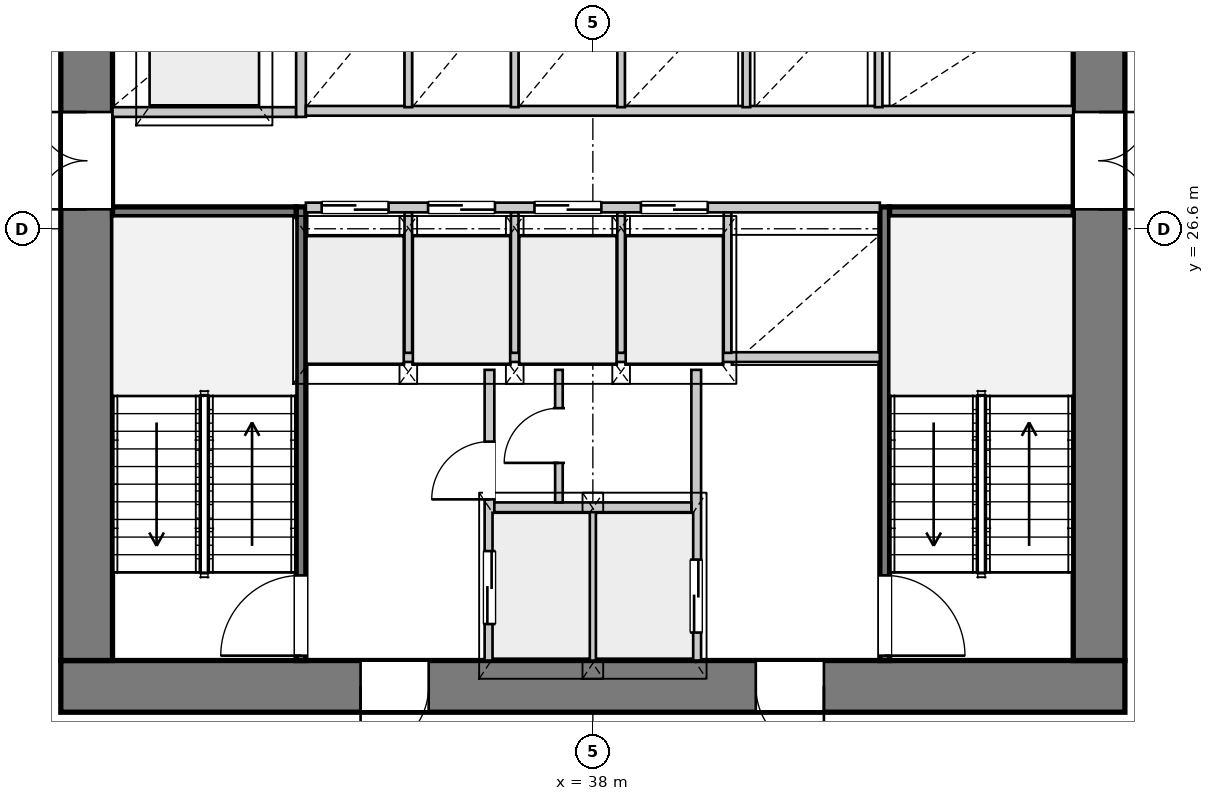
"""IFC4 building model, lengths in metres.
Left out: names, types, materials, properties, quantities, classifications, styles, units other than length and angle.
Written with IfcOpenShell. Run it as: python <this file> out.ifc"""

import sys

from ifc_helpers import new_model, si_unit, direction, frame, frame_2d, origin, place, context, subcontext, project, spatial, rectangle, extrude, source, transform, mapped, element, fill, save


model = new_model("IFC4")
c1 = context("Model", 3, precision=1e-05, world=origin(), true_north=direction((0.0, 1.0)))
c2 = subcontext(c1, "Body", "Model", "MODEL_VIEW")
j1 = project(units=[si_unit("LENGTHUNIT", "METRE"), si_unit("PLANEANGLEUNIT", "RADIAN")], contexts=[c1])
p1 = place(None, origin())
s1 = spatial("IfcSite", under=j1, at=p1, CompositionType="ELEMENT")
p2 = place(p1, origin())
s2 = spatial("IfcBuilding", under=s1, at=p2, CompositionType="ELEMENT")
p3 = place(p2, frame((0.0, 0.0, 32.85)))
s3 = spatial("IfcBuildingStorey", under=s2, at=p3, CompositionType="ELEMENT", Elevation=32.85)
p4 = place(p3, frame((46.75, 19.075, 0.0), z_axis=(0.0, 0.0, 1.0), x_axis=(-1.0, 0.0, 0.0)))
e1 = element("IfcWall", 1, at=p4, inside=s3, PredefinedType="SHEAR", context=c2, shape_type="SweptSolid", body=[
    extrude(rectangle(XDim=17.5, YDim=0.85, at=frame_2d((8.75, 0.0))), origin(), (0.0, 0.0, 1.0), 3.3),
])
p5 = place(p4, frame((4.95, 0.0, 0.0)))
e2 = element("IfcOpeningElement", 2, at=p5, cuts=e1, PredefinedType="OPENING", context=c2, shape_type="SweptSolid", body=[
    extrude(rectangle(XDim=1.12, YDim=2.25, at=frame_2d((0.56, 1.125))), frame((0.0, 0.435, 0.0), z_axis=(0.0, -1.0, 0.0), x_axis=(1.0, 0.0, 0.0)), (0.0, 0.0, 1.0), 0.87),
])
p6 = place(p4, frame((11.45, 0.0, 0.0)))
e3 = element("IfcOpeningElement", 3, at=p6, cuts=e1, PredefinedType="OPENING", context=c2, shape_type="SweptSolid", body=[
    extrude(rectangle(XDim=1.12, YDim=2.25, at=frame_2d((0.56, 1.125))), frame((0.0, 0.435, 0.0), z_axis=(0.0, -1.0, 0.0), x_axis=(1.0, 0.0, 0.0)), (0.0, 0.0, 1.0), 0.87),
])
p7 = place(p3, frame((29.675, 19.5, 0.0), z_axis=(0.0, 0.0, 1.0), x_axis=(0.0, 1.0, 0.0)))
e4 = element("IfcWall", 4, at=p7, inside=s3, PredefinedType="SHEAR", context=c2, shape_type="SweptSolid", body=[
    extrude(rectangle(XDim=14.2, YDim=0.85, at=frame_2d((7.1, 0.0))), origin(), (0.0, 0.0, 1.0), 3.3),
])
p8 = place(p7, frame((7.42, 0.0, 0.0)))
e5 = element("IfcOpeningElement", 5, at=p8, cuts=e4, PredefinedType="OPENING", context=c2, shape_type="SweptSolid", body=[
    extrude(rectangle(XDim=1.6, YDim=2.2, at=frame_2d((0.8, 1.1))), frame((0.0, 0.435, 0.0), z_axis=(0.0, -1.0, 0.0), x_axis=(1.0, 0.0, 0.0)), (0.0, 0.0, 1.0), 0.87),
])
p9 = place(p3, frame((46.325, 33.7, 0.0), z_axis=(0.0, 0.0, 1.0), x_axis=(0.0, -1.0, 0.0)))
e6 = element("IfcWall", 6, at=p9, inside=s3, PredefinedType="SHEAR", context=c2, shape_type="SweptSolid", body=[
    extrude(rectangle(XDim=14.2, YDim=0.85, at=frame_2d((7.1, 0.0))), origin(), (0.0, 0.0, 1.0), 3.3),
])
p10 = place(p9, frame((5.18, 0.0, 0.0)))
e7 = element("IfcOpeningElement", 7, at=p10, cuts=e6, PredefinedType="OPENING", context=c2, shape_type="SweptSolid", body=[
    extrude(rectangle(XDim=1.6, YDim=2.2, at=frame_2d((0.8, 1.1))), frame((0.0, 0.435, 0.0), z_axis=(0.0, -1.0, 0.0), x_axis=(1.0, 0.0, 0.0)), (0.0, 0.0, 1.0), 0.87),
])
p11 = place(p3, frame((33.2, 19.5, 0.0), z_axis=(0.0, 0.0, 1.0), x_axis=(0.0, 1.0, 0.0)))
e8 = element("IfcWall", 8, at=p11, inside=s3, PredefinedType="PARTITIONING", context=c2, shape_type="SweptSolid", body=[
    extrude(rectangle(XDim=7.46, YDim=0.16, at=frame_2d((3.73, 0.0))), origin(), (0.0, 0.0, 1.0), 3.3),
])
p12 = place(p11, frame((0.08, 0.0, 0.0)))
e9 = element("IfcOpeningElement", 9, at=p12, cuts=e8, PredefinedType="OPENING", context=c2, shape_type="SweptSolid", body=[
    extrude(rectangle(XDim=1.32, YDim=2.2, at=frame_2d((0.66, 1.1))), frame((0.0, 0.09, 0.0), z_axis=(0.0, -1.0, 0.0), x_axis=(1.0, 0.0, 0.0)), (0.0, 0.0, 1.0), 0.18),
])
p13 = place(p3, frame((30.1, 26.88, 0.0), z_axis=(0.0, 0.0, 1.0), x_axis=(1.0, 0.0, 0.0)))
e10 = element("IfcWall", 10, at=p13, inside=s3, PredefinedType="PARTITIONING", context=c2, shape_type="SweptSolid", body=[
    extrude(rectangle(XDim=3.02, YDim=0.16, at=frame_2d((1.51, 0.0))), origin(), (0.0, 0.0, 1.0), 3.3),
])
p14 = place(p3, frame((42.8, 26.96, 0.0), z_axis=(0.0, 0.0, 1.0), x_axis=(0.0, -1.0, 0.0)))
e11 = element("IfcWall", 11, at=p14, inside=s3, PredefinedType="PARTITIONING", context=c2, shape_type="SweptSolid", body=[
    extrude(rectangle(XDim=7.46, YDim=0.16, at=frame_2d((3.73, 0.0))), origin(), (0.0, 0.0, 1.0), 3.3),
])
p15 = place(p14, frame((6.06, 0.0, 0.0)))
e12 = element("IfcOpeningElement", 12, at=p15, cuts=e11, PredefinedType="OPENING", context=c2, shape_type="SweptSolid", body=[
    extrude(rectangle(XDim=1.32, YDim=2.2, at=frame_2d((0.66, 1.1))), frame((0.0, 0.09, 0.0), z_axis=(0.0, -1.0, 0.0), x_axis=(1.0, 0.0, 0.0)), (0.0, 0.0, 1.0), 0.18),
])
p16 = place(p3, frame((42.88, 26.88, 0.0), z_axis=(0.0, 0.0, 1.0), x_axis=(1.0, 0.0, 0.0)))
e13 = element("IfcWall", 13, at=p16, inside=s3, PredefinedType="PARTITIONING", context=c2, shape_type="SweptSolid", body=[
    extrude(rectangle(XDim=3.02, YDim=0.16, at=frame_2d((1.51, 0.0))), origin(), (0.0, 0.0, 1.0), 3.3),
])
p17 = place(p3, frame((36.3, 19.5, 0.0), z_axis=(0.0, 0.0, 1.0), x_axis=(0.0, 1.0, 0.0)))
e14 = element("IfcWall", 14, at=p17, inside=s3, PredefinedType="PARTITIONING", context=c2, shape_type="SweptSolid", body=[
    extrude(rectangle(XDim=4.78, YDim=0.16, at=frame_2d((2.39, 0.0))), origin(), (0.0, 0.0, 1.0), 3.3),
])
p18 = place(p17, frame((0.6, 0.0, 0.0)))
e15 = element("IfcOpeningElement", 15, at=p18, cuts=e14, PredefinedType="OPENING", context=c2, shape_type="SweptSolid", body=[
    extrude(rectangle(XDim=1.2, YDim=2.2, at=frame_2d((0.6, 1.1))), frame((0.0, 0.09, 0.0), z_axis=(0.0, -1.0, 0.0), x_axis=(1.0, 0.0, 0.0)), (0.0, 0.0, 1.0), 0.18),
])
p19 = place(p17, frame((2.65, 0.0, 0.0)))
e16 = element("IfcOpeningElement", 16, at=p19, cuts=e14, PredefinedType="OPENING", context=c2, shape_type="SweptSolid", body=[
    extrude(rectangle(XDim=0.95, YDim=2.1, at=frame_2d((0.475, 1.05))), frame((0.0, 0.09, 0.0), z_axis=(0.0, -1.0, 0.0), x_axis=(1.0, 0.0, 0.0)), (0.0, 0.0, 1.0), 0.18),
])
p20 = place(p3, frame((39.7, 24.28, 0.0), z_axis=(0.0, 0.0, 1.0), x_axis=(0.0, -1.0, 0.0)))
e17 = element("IfcWall", 17, at=p20, inside=s3, PredefinedType="PARTITIONING", context=c2, shape_type="SweptSolid", body=[
    extrude(rectangle(XDim=4.78, YDim=0.16, at=frame_2d((2.39, 0.0))), origin(), (0.0, 0.0, 1.0), 3.3),
])
p21 = place(p20, frame((3.12, 0.0, 0.0)))
e18 = element("IfcOpeningElement", 18, at=p21, cuts=e17, PredefinedType="OPENING", context=c2, shape_type="SweptSolid", body=[
    extrude(rectangle(XDim=1.2, YDim=2.2, at=frame_2d((0.6, 1.1))), frame((0.0, 0.09, 0.0), z_axis=(0.0, -1.0, 0.0), x_axis=(1.0, 0.0, 0.0)), (0.0, 0.0, 1.0), 0.18),
])
p22 = place(p3, frame((38.0, 19.5, 0.0), z_axis=(0.0, 0.0, 1.0), x_axis=(0.0, 1.0, 0.0)))
e19 = element("IfcWall", 19, at=p22, inside=s3, PredefinedType="PARTITIONING", context=c2, shape_type="SweptSolid", body=[
    extrude(rectangle(XDim=2.46, YDim=0.125, at=frame_2d((1.23, 0.0))), origin(), (0.0, 0.0, 1.0), 3.3),
])
p23 = place(p3, frame((36.38, 22.02, 0.0), z_axis=(0.0, 0.0, 1.0), x_axis=(1.0, 0.0, 0.0)))
e20 = element("IfcWall", 20, at=p23, inside=s3, PredefinedType="PARTITIONING", context=c2, shape_type="SweptSolid", body=[
    extrude(rectangle(XDim=3.24, YDim=0.16, at=frame_2d((1.62, 0.0))), origin(), (0.0, 0.0, 1.0), 3.3),
])
p24 = place(p3, frame((33.28, 24.49, 0.0), z_axis=(0.0, 0.0, 1.0), x_axis=(1.0, 0.0, 0.0)))
e21 = element("IfcWall", 21, at=p24, inside=s3, PredefinedType="PARTITIONING", context=c2, shape_type="SweptSolid", body=[
    extrude(rectangle(XDim=9.44, YDim=0.16, at=frame_2d((4.72, 0.0))), origin(), (0.0, 0.0, 1.0), 3.3),
])
p25 = place(p3, frame((37.442, 22.1, 0.0), z_axis=(0.0, 0.0, 1.0), x_axis=(0.0, 1.0, 0.0)))
e22 = element("IfcWall", 22, at=p25, inside=s3, PredefinedType="PARTITIONING", context=c2, shape_type="SweptSolid", body=[
    extrude(rectangle(XDim=2.18, YDim=0.125, at=frame_2d((1.09, 0.0))), origin(), (0.0, 0.0, 1.0), 3.3),
])
p26 = place(p25, frame((0.65, 0.0, 0.0)))
e23 = element("IfcOpeningElement", 23, at=p26, cuts=e22, PredefinedType="OPENING", context=c2, shape_type="SweptSolid", body=[
    extrude(rectangle(XDim=0.9, YDim=2.1, at=frame_2d((0.45, 1.05))), frame((0.0, 0.073, 0.0), z_axis=(0.0, -1.0, 0.0), x_axis=(1.0, 0.0, 0.0)), (0.0, 0.0, 1.0), 0.145),
])
p27 = place(p3, frame((30.1, 28.52, 0.0), z_axis=(0.0, 0.0, 1.0), x_axis=(1.0, 0.0, 0.0)))
e24 = element("IfcWall", 24, at=p27, inside=s3, PredefinedType="PARTITIONING", context=c2, shape_type="SweptSolid", body=[
    extrude(rectangle(XDim=3.02, YDim=0.16, at=frame_2d((1.51, 0.0))), origin(), (0.0, 0.0, 1.0), 3.3),
])
p28 = place(p3, frame((33.2, 28.44, 0.0), z_axis=(0.0, 0.0, 1.0), x_axis=(0.0, 1.0, 0.0)))
e25 = element("IfcWall", 25, at=p28, inside=s3, PredefinedType="PARTITIONING", context=c2, shape_type="SweptSolid", body=[
    extrude(rectangle(XDim=5.26, YDim=0.16, at=frame_2d((2.63, 0.0))), origin(), (0.0, 0.0, 1.0), 3.3),
])
p29 = place(p3, frame((33.28, 26.95, 0.0), z_axis=(0.0, 0.0, 1.0), x_axis=(1.0, 0.0, 0.0)))
e26 = element("IfcWall", 26, at=p29, inside=s3, PredefinedType="PARTITIONING", context=c2, shape_type="SweptSolid", body=[
    extrude(rectangle(XDim=9.44, YDim=0.16, at=frame_2d((4.72, 0.0))), origin(), (0.0, 0.0, 1.0), 3.3),
])
p30 = place(p29, frame((0.26, 0.0, 0.0)))
e27 = element("IfcOpeningElement", 27, at=p30, cuts=e26, PredefinedType="OPENING", context=c2, shape_type="SweptSolid", body=[
    extrude(rectangle(XDim=1.1, YDim=2.2, at=frame_2d((0.55, 1.1))), frame((0.0, 0.09, 0.0), z_axis=(0.0, -1.0, 0.0), x_axis=(1.0, 0.0, 0.0)), (0.0, 0.0, 1.0), 0.18),
])
p31 = place(p29, frame((2.01, 0.0, 0.0)))
e28 = element("IfcOpeningElement", 28, at=p31, cuts=e26, PredefinedType="OPENING", context=c2, shape_type="SweptSolid", body=[
    extrude(rectangle(XDim=1.1, YDim=2.2, at=frame_2d((0.55, 1.1))), frame((0.0, 0.09, 0.0), z_axis=(0.0, -1.0, 0.0), x_axis=(1.0, 0.0, 0.0)), (0.0, 0.0, 1.0), 0.18),
])
p32 = place(p29, frame((3.76, 0.0, 0.0)))
e29 = element("IfcOpeningElement", 29, at=p32, cuts=e26, PredefinedType="OPENING", context=c2, shape_type="SweptSolid", body=[
    extrude(rectangle(XDim=1.1, YDim=2.2, at=frame_2d((0.55, 1.1))), frame((0.0, 0.09, 0.0), z_axis=(0.0, -1.0, 0.0), x_axis=(1.0, 0.0, 0.0)), (0.0, 0.0, 1.0), 0.18),
])
p33 = place(p29, frame((5.51, 0.0, 0.0)))
e30 = element("IfcOpeningElement", 30, at=p33, cuts=e26, PredefinedType="OPENING", context=c2, shape_type="SweptSolid", body=[
    extrude(rectangle(XDim=1.1, YDim=2.2, at=frame_2d((0.55, 1.1))), frame((0.0, 0.09, 0.0), z_axis=(0.0, -1.0, 0.0), x_axis=(1.0, 0.0, 0.0)), (0.0, 0.0, 1.0), 0.18),
])
for number, where, z_axis, x_axis in (
    (31, (34.965, 24.56, 0.0), (0.0, 0.0, 1.0), (0.0, 1.0, 0.0)),
    (32, (36.715, 24.56, 0.0), (0.0, 0.0, 1.0), (0.0, 1.0, 0.0)),
    (33, (38.465, 24.56, 0.0), (0.0, 0.0, 1.0), (0.0, 1.0, 0.0)),
    (34, (40.215, 24.56, 0.0), (0.0, 0.0, 1.0), (0.0, 1.0, 0.0)),
):
    element("IfcWall", number, at=place(p3, frame(where, z_axis=z_axis, x_axis=x_axis)), inside=s3, PredefinedType="PARTITIONING", context=c2, shape_type="SweptSolid", body=[
        extrude(rectangle(XDim=2.31, YDim=0.125, at=frame_2d((1.155, 0.0))), origin(), (0.0, 0.0, 1.0), 3.3),
    ])
p34 = place(p3, frame((33.28, 28.54, 0.0), z_axis=(0.0, 0.0, 1.0), x_axis=(1.0, 0.0, 0.0)))
e35 = element("IfcWall", 35, at=p34, inside=s3, PredefinedType="PARTITIONING", context=c2, shape_type="SweptSolid", body=[
    extrude(rectangle(XDim=12.62, YDim=0.16, at=frame_2d((6.31, 0.0))), origin(), (0.0, 0.0, 1.0), 3.3),
])
for number, where, z_axis, x_axis in (
    (36, (34.965, 28.6, 0.0), (0.0, 0.0, 1.0), (0.0, 1.0, 0.0)),
    (37, (36.715, 28.6, 0.0), (0.0, 0.0, 1.0), (0.0, 1.0, 0.0)),
    (38, (38.465, 28.6, 0.0), (0.0, 0.0, 1.0), (0.0, 1.0, 0.0)),
    (39, (40.525, 28.6, 0.0), (0.0, 0.0, 1.0), (0.0, 1.0, 0.0)),
    (40, (42.7, 28.6, 0.0), (0.0, 0.0, 1.0), (0.0, 1.0, 0.0)),
):
    element("IfcWall", number, at=place(p3, frame(where, z_axis=z_axis, x_axis=x_axis)), inside=s3, PredefinedType="PARTITIONING", context=c2, shape_type="SweptSolid", body=[
        extrude(rectangle(XDim=1.92, YDim=0.125, at=frame_2d((0.96, 0.0))), origin(), (0.0, 0.0, 1.0), 3.3),
    ])
m1 = source(origin(), c2, "Body", "SweptSolid", [
    extrude(rectangle(XDim=1.12, YDim=2.25, at=frame_2d((0.56, 1.125))), frame((0.0, 0.025, 0.0), z_axis=(0.0, -1.0, 0.0), x_axis=(1.0, 0.0, 0.0)), (0.0, 0.0, 1.0), 0.05),
])
p35 = place(p5, origin())
e41 = element("IfcDoor", 41, at=p35, inside=s3, OperationType="SINGLE_SWING_LEFT", PredefinedType="DOOR", context=c2, shape_type="MappedRepresentation", body=[
    mapped(m1, transform((0.0, 0.0, 0.0), x_axis=(1.0, 0.0, 0.0), y_axis=(0.0, 1.0, 0.0), z_axis=(0.0, 0.0, 1.0), scale=1.0)),
])
fill(e2, e41)
p36 = place(p6, origin())
e42 = element("IfcDoor", 42, at=p36, inside=s3, OperationType="SINGLE_SWING_RIGHT", PredefinedType="DOOR", context=c2, shape_type="MappedRepresentation", body=[
    mapped(m1, transform((0.0, 0.0, 0.0), x_axis=(1.0, 0.0, 0.0), y_axis=(0.0, 1.0, 0.0), z_axis=(0.0, 0.0, 1.0), scale=1.0)),
])
fill(e3, e42)
m2 = source(origin(), c2, "Body", "SweptSolid", [
    extrude(rectangle(XDim=1.6, YDim=2.2, at=frame_2d((0.8, 1.1))), frame((0.0, 0.025, 0.0), z_axis=(0.0, -1.0, 0.0), x_axis=(1.0, 0.0, 0.0)), (0.0, 0.0, 1.0), 0.05),
])
p37 = place(p8, origin())
e43 = element("IfcDoor", 43, at=p37, inside=s3, OperationType="DOUBLE_DOOR_SINGLE_SWING", PredefinedType="DOOR", context=c2, shape_type="MappedRepresentation", body=[
    mapped(m2, transform((0.0, 0.0, 0.0), x_axis=(1.0, 0.0, 0.0), y_axis=(0.0, 1.0, 0.0), z_axis=(0.0, 0.0, 1.0), scale=1.0)),
])
fill(e5, e43)
p38 = place(p10, origin())
e44 = element("IfcDoor", 44, at=p38, inside=s3, OperationType="DOUBLE_DOOR_SINGLE_SWING", PredefinedType="DOOR", context=c2, shape_type="MappedRepresentation", body=[
    mapped(m2, transform((0.0, 0.0, 0.0), x_axis=(1.0, 0.0, 0.0), y_axis=(0.0, 1.0, 0.0), z_axis=(0.0, 0.0, 1.0), scale=1.0)),
])
fill(e7, e44)
m3 = source(origin(), c2, "Body", "SweptSolid", [
    extrude(rectangle(XDim=1.32, YDim=2.2, at=frame_2d((0.66, 1.1))), frame((0.0, 0.025, 0.0), z_axis=(0.0, -1.0, 0.0), x_axis=(1.0, 0.0, 0.0)), (0.0, 0.0, 1.0), 0.05),
])
p39 = place(p12, origin())
e45 = element("IfcDoor", 45, at=p39, inside=s3, OperationType="SINGLE_SWING_LEFT", PredefinedType="DOOR", context=c2, shape_type="MappedRepresentation", body=[
    mapped(m3, transform((0.0, 0.0, 0.0), x_axis=(1.0, 0.0, 0.0), y_axis=(0.0, 1.0, 0.0), z_axis=(0.0, 0.0, 1.0), scale=1.0)),
])
fill(e9, e45)
p40 = place(p15, origin())
e46 = element("IfcDoor", 46, at=p40, inside=s3, OperationType="SINGLE_SWING_RIGHT", PredefinedType="DOOR", context=c2, shape_type="MappedRepresentation", body=[
    mapped(m3, transform((0.0, 0.0, 0.0), x_axis=(1.0, 0.0, 0.0), y_axis=(0.0, 1.0, 0.0), z_axis=(0.0, 0.0, 1.0), scale=1.0)),
])
fill(e12, e46)
m4 = source(origin(), c2, "Body", "SweptSolid", [
    extrude(rectangle(XDim=1.2, YDim=2.2, at=frame_2d((0.6, 1.1))), frame((0.0, 0.025, 0.0), z_axis=(0.0, -1.0, 0.0), x_axis=(1.0, 0.0, 0.0)), (0.0, 0.0, 1.0), 0.05),
])
p41 = place(p18, origin())
e47 = element("IfcDoor", 47, at=p41, inside=s3, OperationType="DOUBLE_DOOR_SLIDING", PredefinedType="DOOR", context=c2, shape_type="MappedRepresentation", body=[
    mapped(m4, transform((0.0, 0.0, 0.0), x_axis=(1.0, 0.0, 0.0), y_axis=(0.0, 1.0, 0.0), z_axis=(0.0, 0.0, 1.0), scale=1.0)),
])
fill(e15, e47)
m5 = source(origin(), c2, "Body", "SweptSolid", [
    extrude(rectangle(XDim=0.95, YDim=2.1, at=frame_2d((0.475, 1.05))), frame((0.0, 0.025, 0.0), z_axis=(0.0, -1.0, 0.0), x_axis=(1.0, 0.0, 0.0)), (0.0, 0.0, 1.0), 0.05),
])
p42 = place(p19, origin())
e48 = element("IfcDoor", 48, at=p42, inside=s3, OperationType="SINGLE_SWING_LEFT", PredefinedType="DOOR", context=c2, shape_type="MappedRepresentation", body=[
    mapped(m5, transform((0.0, 0.0, 0.0), x_axis=(1.0, 0.0, 0.0), y_axis=(0.0, 1.0, 0.0), z_axis=(0.0, 0.0, 1.0), scale=1.0)),
])
fill(e16, e48)
m6 = source(origin(), c2, "Body", "SweptSolid", [
    extrude(rectangle(XDim=0.9, YDim=2.1, at=frame_2d((0.45, 1.05))), frame((0.0, 0.025, 0.0), z_axis=(0.0, -1.0, 0.0), x_axis=(1.0, 0.0, 0.0)), (0.0, 0.0, 1.0), 0.05),
])
p43 = place(p26, origin())
e49 = element("IfcDoor", 49, at=p43, inside=s3, OperationType="SINGLE_SWING_LEFT", PredefinedType="DOOR", context=c2, shape_type="MappedRepresentation", body=[
    mapped(m6, transform((0.0, 0.0, 0.0), x_axis=(1.0, 0.0, 0.0), y_axis=(0.0, 1.0, 0.0), z_axis=(0.0, 0.0, 1.0), scale=1.0)),
])
fill(e23, e49)
p44 = place(p21, origin())
e50 = element("IfcDoor", 50, at=p44, inside=s3, OperationType="DOUBLE_DOOR_SLIDING", PredefinedType="DOOR", context=c2, shape_type="MappedRepresentation", body=[
    mapped(m4, transform((0.0, 0.0, 0.0), x_axis=(1.0, 0.0, 0.0), y_axis=(0.0, 1.0, 0.0), z_axis=(0.0, 0.0, 1.0), scale=1.0)),
])
fill(e18, e50)
m7 = source(origin(), c2, "Body", "SweptSolid", [
    extrude(rectangle(XDim=1.1, YDim=2.2, at=frame_2d((0.55, 1.1))), frame((0.0, 0.025, 0.0), z_axis=(0.0, -1.0, 0.0), x_axis=(1.0, 0.0, 0.0)), (0.0, 0.0, 1.0), 0.05),
])
p45 = place(p30, origin())
e51 = element("IfcDoor", 51, at=p45, inside=s3, OperationType="DOUBLE_DOOR_SLIDING", PredefinedType="DOOR", context=c2, shape_type="MappedRepresentation", body=[
    mapped(m7, transform((0.0, 0.0, 0.0), x_axis=(1.0, 0.0, 0.0), y_axis=(0.0, 1.0, 0.0), z_axis=(0.0, 0.0, 1.0), scale=1.0)),
])
fill(e27, e51)
p46 = place(p31, origin())
e52 = element("IfcDoor", 52, at=p46, inside=s3, OperationType="DOUBLE_DOOR_SLIDING", PredefinedType="DOOR", context=c2, shape_type="MappedRepresentation", body=[
    mapped(m7, transform((0.0, 0.0, 0.0), x_axis=(1.0, 0.0, 0.0), y_axis=(0.0, 1.0, 0.0), z_axis=(0.0, 0.0, 1.0), scale=1.0)),
])
fill(e28, e52)
p47 = place(p32, origin())
e53 = element("IfcDoor", 53, at=p47, inside=s3, OperationType="DOUBLE_DOOR_SLIDING", PredefinedType="DOOR", context=c2, shape_type="MappedRepresentation", body=[
    mapped(m7, transform((0.0, 0.0, 0.0), x_axis=(1.0, 0.0, 0.0), y_axis=(0.0, 1.0, 0.0), z_axis=(0.0, 0.0, 1.0), scale=1.0)),
])
fill(e29, e53)
p48 = place(p33, origin())
e54 = element("IfcDoor", 54, at=p48, inside=s3, OperationType="DOUBLE_DOOR_SLIDING", PredefinedType="DOOR", context=c2, shape_type="MappedRepresentation", body=[
    mapped(m7, transform((0.0, 0.0, 0.0), x_axis=(1.0, 0.0, 0.0), y_axis=(0.0, 1.0, 0.0), z_axis=(0.0, 0.0, 1.0), scale=1.0)),
])
fill(e30, e54)
save(model, sys.argv[1])
